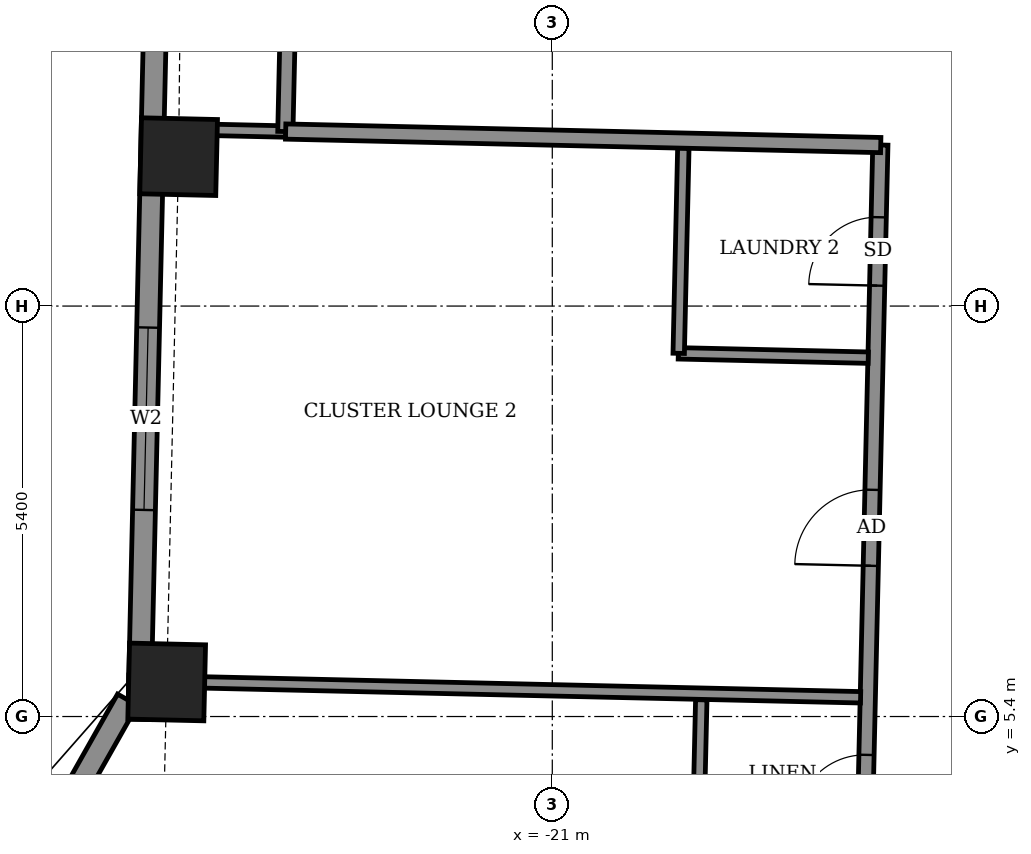
"""IFC4 building model, lengths in metres.
Left out: names, types, materials, properties, quantities, classifications, styles, units other than length and angle.
Written with IfcOpenShell. Run it as: python <this file> out.ifc"""

import sys

from ifc_helpers import new_model, si_unit, direction, frame, frame_2d, origin, origin_2d, place, context, subcontext, project, spatial, rectangle, extrude, element, fill, save


model = new_model("IFC4")
c1 = context("Model", 3, precision=1e-05, world=origin(), true_north=direction((0.0, 1.0)))
c2 = subcontext(c1, "Body", "Model", "MODEL_VIEW")
j1 = project(units=[si_unit("LENGTHUNIT", "METRE"), si_unit("PLANEANGLEUNIT", "RADIAN")], contexts=[c1])
p1 = place(None, origin())
s1 = spatial("IfcSite", under=j1, at=p1, CompositionType="ELEMENT")
p2 = place(p1, origin())
s2 = spatial("IfcBuilding", under=s1, at=p2, CompositionType="ELEMENT")
p3 = place(p2, frame((0.0, 0.0, 268.1)))
s3 = spatial("IfcBuildingStorey", under=s2, at=p3, CompositionType="ELEMENT", Elevation=268.1)
for number, where, z_axis, x_axis in (
    (1, (-25.916, 12.766, -0.55), (0.0, 0.0, 1.0), (-0.023, -1.0, 0.0)),
    (2, (-26.073, 5.855, -0.55), (0.0, 0.0, 1.0), (-0.023, -1.0, 0.0)),
):
    element("IfcColumn", number, at=place(p3, frame(where, z_axis=z_axis, x_axis=x_axis)), inside=s3, PredefinedType="COLUMN", context=c2, shape_type="SweptSolid", body=[
        extrude(rectangle(XDim=1.0, YDim=1.0, at=origin_2d()), origin(), (0.0, 0.0, 1.0), 3.6),
    ])
p4 = place(p3, frame((-26.113, 19.534, 0.0), z_axis=(0.0, 0.0, 1.0), x_axis=(-0.022649415303, -0.999743469089, 0.0)))
e3 = element("IfcWall", 3, at=p4, inside=s3, PredefinedType="SOLIDWALL", context=c2, shape_type="SweptSolid", body=[
    extrude(rectangle(XDim=14.175, YDim=0.3, at=frame_2d((7.087, 0.0))), origin(), (0.0, 0.0, 1.0), 2.55),
])
p5 = place(p4, frame((2.735, 0.0, 0.0)))
e4 = element("IfcOpeningElement", 4, at=p5, cuts=e3, PredefinedType="OPENING", context=c2, shape_type="SweptSolid", body=[
    extrude(rectangle(XDim=1.5, YDim=2.4, at=frame_2d((0.75, 1.2))), frame((0.0, 0.16, 0.0), z_axis=(0.0, -1.0, 0.0), x_axis=(1.0, 0.0, 0.0)), (0.0, 0.0, 1.0), 0.32),
])
p6 = place(p4, frame((9.019, 0.0, 0.9)))
e5 = element("IfcOpeningElement", 5, at=p6, cuts=e3, PredefinedType="OPENING", context=c2, shape_type="SweptSolid", body=[
    extrude(rectangle(XDim=2.4, YDim=1.5, at=frame_2d((1.2, 0.75))), frame((0.0, 0.16, 0.0), z_axis=(0.0, -1.0, 0.0), x_axis=(1.0, 0.0, 0.0)), (0.0, 0.0, 1.0), 0.32),
])
p7 = place(p3, frame((-26.589, 5.621, 0.0), z_axis=(0.0, 0.0, 1.0), x_axis=(-0.492495436053, -0.870315026566, 0.0)))
e6 = element("IfcWall", 6, at=p7, inside=s3, PredefinedType="SOLIDWALL", context=c2, shape_type="SweptSolid", body=[
    extrude(rectangle(XDim=5.397, YDim=0.3, at=frame_2d((2.698, 0.0))), origin(), (0.0, 0.0, 1.0), 3.05),
])
p8 = place(p7, frame((2.007, 0.0, 0.9)))
e7 = element("IfcOpeningElement", 7, at=p8, cuts=e6, PredefinedType="OPENING", context=c2, shape_type="SweptSolid", body=[
    extrude(rectangle(XDim=1.2, YDim=1.5, at=frame_2d((0.6, 0.75))), frame((0.0, 0.16, 0.0), z_axis=(0.0, -1.0, 0.0), x_axis=(1.0, 0.0, 0.0)), (0.0, 0.0, 1.0), 0.32),
])
p9 = place(p3, frame((-17.262, -12.525, 0.0), z_axis=(0.0, 0.0, 1.0), x_axis=(0.022706151961, 0.999742182097, 0.0)))
e8 = element("IfcWall", 8, at=p9, inside=s3, PredefinedType="PARTITIONING", context=c2, shape_type="SweptSolid", body=[
    extrude(rectangle(XDim=25.45, YDim=0.2, at=frame_2d((12.725, 0.0))), origin(), (0.0, 0.0, 1.0), 3.05),
])
p10 = place(p9, frame((19.913, 0.0, 0.0)))
e9 = element("IfcOpeningElement", 9, at=p10, cuts=e8, PredefinedType="OPENING", context=c2, shape_type="SweptSolid", body=[
    extrude(rectangle(XDim=1.0, YDim=2.1, at=frame_2d((0.5, 1.05))), frame((0.0, 0.11, 0.0), z_axis=(0.0, -1.0, 0.0), x_axis=(1.0, 0.0, 0.0)), (0.0, 0.0, 1.0), 0.22),
])
p11 = place(p9, frame((23.6, 0.0, 0.0)))
e10 = element("IfcOpeningElement", 10, at=p11, cuts=e8, PredefinedType="OPENING", context=c2, shape_type="SweptSolid", body=[
    extrude(rectangle(XDim=0.9, YDim=2.1, at=frame_2d((0.45, 1.05))), frame((0.0, 0.11, 0.0), z_axis=(0.0, -1.0, 0.0), x_axis=(1.0, 0.0, 0.0)), (0.0, 0.0, 1.0), 0.22),
])
p12 = place(p9, frame((14.325, 0.0, 0.0)))
e11 = element("IfcOpeningElement", 11, at=p12, cuts=e8, PredefinedType="OPENING", context=c2, shape_type="SweptSolid", body=[
    extrude(rectangle(XDim=1.0, YDim=2.1, at=frame_2d((0.5, 1.05))), frame((0.0, 0.11, 0.0), z_axis=(0.0, -1.0, 0.0), x_axis=(1.0, 0.0, 0.0)), (0.0, 0.0, 1.0), 0.22),
])
p13 = place(p9, frame((16.525, 0.0, 0.0)))
e12 = element("IfcOpeningElement", 12, at=p13, cuts=e8, PredefinedType="OPENING", context=c2, shape_type="SweptSolid", body=[
    extrude(rectangle(XDim=0.9, YDim=2.1, at=frame_2d((0.45, 1.05))), frame((0.0, 0.11, 0.0), z_axis=(0.0, -1.0, 0.0), x_axis=(1.0, 0.0, 0.0)), (0.0, 0.0, 1.0), 0.22),
])
p14 = place(p9, frame((9.85, 0.0, 0.0)))
e13 = element("IfcOpeningElement", 13, at=p14, cuts=e8, PredefinedType="OPENING", context=c2, shape_type="SweptSolid", body=[
    extrude(rectangle(XDim=1.0, YDim=2.1, at=frame_2d((0.5, 1.05))), frame((0.0, 0.11, 0.0), z_axis=(0.0, -1.0, 0.0), x_axis=(1.0, 0.0, 0.0)), (0.0, 0.0, 1.0), 0.22),
])
p15 = place(p9, frame((12.125, 0.0, 0.0)))
e14 = element("IfcOpeningElement", 14, at=p15, cuts=e8, PredefinedType="OPENING", context=c2, shape_type="SweptSolid", body=[
    extrude(rectangle(XDim=0.9, YDim=2.1, at=frame_2d((0.45, 1.05))), frame((0.0, 0.11, 0.0), z_axis=(0.0, -1.0, 0.0), x_axis=(1.0, 0.0, 0.0)), (0.0, 0.0, 1.0), 0.22),
])
p16 = place(p9, frame((7.725, 0.0, 0.0)))
e15 = element("IfcOpeningElement", 15, at=p16, cuts=e8, PredefinedType="OPENING", context=c2, shape_type="SweptSolid", body=[
    extrude(rectangle(XDim=1.0, YDim=2.1, at=frame_2d((0.5, 1.05))), frame((0.0, 0.11, 0.0), z_axis=(0.0, -1.0, 0.0), x_axis=(1.0, 0.0, 0.0)), (0.0, 0.0, 1.0), 0.22),
])
p17 = place(p9, frame((5.275, 0.0, 0.0)))
e16 = element("IfcOpeningElement", 16, at=p17, cuts=e8, PredefinedType="OPENING", context=c2, shape_type="SweptSolid", body=[
    extrude(rectangle(XDim=0.9, YDim=2.1, at=frame_2d((0.45, 1.05))), frame((0.0, 0.11, 0.0), z_axis=(0.0, -1.0, 0.0), x_axis=(1.0, 0.0, 0.0)), (0.0, 0.0, 1.0), 0.22),
])
p18 = place(p9, frame((0.512, 0.0, 0.0)))
e17 = element("IfcOpeningElement", 17, at=p18, cuts=e8, PredefinedType="OPENING", context=c2, shape_type="SweptSolid", body=[
    extrude(rectangle(XDim=1.0, YDim=2.1, at=frame_2d((0.5, 1.05))), frame((0.0, 0.11, 0.0), z_axis=(0.0, -1.0, 0.0), x_axis=(1.0, 0.0, 0.0)), (0.0, 0.0, 1.0), 0.22),
])
p19 = place(p9, frame((2.775, 0.0, 0.0)))
e18 = element("IfcOpeningElement", 18, at=p19, cuts=e8, PredefinedType="OPENING", context=c2, shape_type="SweptSolid", body=[
    extrude(rectangle(XDim=0.9, YDim=2.1, at=frame_2d((0.45, 1.05))), frame((0.0, 0.11, 0.0), z_axis=(0.0, -1.0, 0.0), x_axis=(1.0, 0.0, 0.0)), (0.0, 0.0, 1.0), 0.22),
])
p20 = place(p3, frame((-19.093, 3.296, 0.0), z_axis=(0.0, 0.0, 1.0), x_axis=(0.022788198363, 0.99974031529, 0.0)))
e19 = element("IfcWall", 19, at=p20, inside=s3, PredefinedType="PARTITIONING", context=c2, shape_type="SweptSolid", body=[
    extrude(rectangle(XDim=2.325, YDim=0.15, at=frame_2d((1.162, 0.0))), origin(), (0.0, 0.0, 1.0), 3.05),
])
p21 = place(p3, frame((-26.573, 5.871, 0.0), z_axis=(0.0, 0.0, 1.0), x_axis=(0.999743768709, -0.022636186244, 0.0)))
e20 = element("IfcWall", 20, at=p21, inside=s3, PredefinedType="PARTITIONING", context=c2, shape_type="SweptSolid", body=[
    extrude(rectangle(XDim=9.631, YDim=0.15, at=frame_2d((4.816, 0.0))), origin(), (0.0, 0.0, 1.0), 3.05),
])
p22 = place(p3, frame((-19.342, 10.178, 0.0), z_axis=(0.0, 0.0, 1.0), x_axis=(0.999741028149, -0.022756903044, 0.0)))
e21 = element("IfcWall", 21, at=p22, inside=s3, PredefinedType="PARTITIONING", context=c2, shape_type="SweptSolid", body=[
    extrude(rectangle(XDim=2.5, YDim=0.15, at=frame_2d((1.25, 0.0))), origin(), (0.0, 0.0, 1.0), 3.05),
])
p23 = place(p3, frame((-19.337, 10.178, 0.0), z_axis=(0.0, 0.0, 1.0), x_axis=(0.02260842146, 0.999744396973, 0.0)))
e22 = element("IfcWall", 22, at=p23, inside=s3, PredefinedType="PARTITIONING", context=c2, shape_type="SweptSolid", body=[
    extrude(rectangle(XDim=2.7, YDim=0.15, at=frame_2d((1.35, 0.0))), origin(), (0.0, 0.0, 1.0), 3.05),
])
p24 = place(p3, frame((-26.108, 13.132, 0.0), z_axis=(0.0, 0.0, 1.0), x_axis=(0.999746371854, -0.022520922836, 0.0)))
e23 = element("IfcWall", 23, at=p24, inside=s3, PredefinedType="PARTITIONING", context=c2, shape_type="SweptSolid", body=[
    extrude(rectangle(XDim=1.604, YDim=0.15, at=frame_2d((0.802, 0.0))), origin(), (0.0, 0.0, 1.0), 3.05),
])
p25 = place(p3, frame((-24.512, 13.096, 0.0), z_axis=(0.0, 0.0, 1.0), x_axis=(0.022617910375, 0.999744182344, 0.0)))
e24 = element("IfcWall", 24, at=p25, inside=s3, PredefinedType="PARTITIONING", context=c2, shape_type="SweptSolid", body=[
    extrude(rectangle(XDim=1.5, YDim=0.2, at=frame_2d((0.75, 0.0))), origin(), (0.0, 0.0, 1.0), 3.05),
])
p26 = place(p3, frame((-24.508, 13.096, 0.0), z_axis=(0.0, 0.0, 1.0), x_axis=(0.99974170677, -0.022727070732, 0.0)))
e25 = element("IfcWall", 25, at=p26, inside=s3, PredefinedType="PARTITIONING", context=c2, shape_type="SweptSolid", body=[
    extrude(rectangle(XDim=7.831, YDim=0.2, at=frame_2d((3.916, 0.0))), origin(), (0.0, 0.0, 1.0), 3.05),
])
p27 = place(p3, frame((-24.474, 14.596, 0.0), z_axis=(0.0, 0.0, 1.0), x_axis=(0.999742424031, -0.022695497208, 0.0)))
e26 = element("IfcWall", 26, at=p27, inside=s3, PredefinedType="PARTITIONING", context=c2, shape_type="SweptSolid", body=[
    extrude(rectangle(XDim=52.872, YDim=0.2, at=frame_2d((26.436, 0.0))), origin(), (0.0, 0.0, 1.0), 3.05),
])
p28 = place(p27, frame((51.161, 0.0, 0.0)))
e27 = element("IfcOpeningElement", 27, at=p28, cuts=e26, PredefinedType="OPENING", context=c2, shape_type="SweptSolid", body=[
    extrude(rectangle(XDim=1.0, YDim=2.1, at=frame_2d((0.5, 1.05))), frame((0.0, 0.11, 0.0), z_axis=(0.0, -1.0, 0.0), x_axis=(1.0, 0.0, 0.0)), (0.0, 0.0, 1.0), 0.22),
])
p29 = place(p27, frame((46.7, 0.0, 0.0)))
e28 = element("IfcOpeningElement", 28, at=p29, cuts=e26, PredefinedType="OPENING", context=c2, shape_type="SweptSolid", body=[
    extrude(rectangle(XDim=0.9, YDim=2.1, at=frame_2d((0.45, 1.05))), frame((0.0, 0.11, 0.0), z_axis=(0.0, -1.0, 0.0), x_axis=(1.0, 0.0, 0.0)), (0.0, 0.0, 1.0), 0.22),
])
p30 = place(p27, frame((44.3, 0.0, 0.0)))
e29 = element("IfcOpeningElement", 29, at=p30, cuts=e26, PredefinedType="OPENING", context=c2, shape_type="SweptSolid", body=[
    extrude(rectangle(XDim=0.9, YDim=2.1, at=frame_2d((0.45, 1.05))), frame((0.0, 0.11, 0.0), z_axis=(0.0, -1.0, 0.0), x_axis=(1.0, 0.0, 0.0)), (0.0, 0.0, 1.0), 0.22),
])
p31 = place(p27, frame((37.575, 0.0, 0.0)))
e30 = element("IfcOpeningElement", 30, at=p31, cuts=e26, PredefinedType="OPENING", context=c2, shape_type="SweptSolid", body=[
    extrude(rectangle(XDim=0.9, YDim=2.1, at=frame_2d((0.45, 1.05))), frame((0.0, 0.11, 0.0), z_axis=(0.0, -1.0, 0.0), x_axis=(1.0, 0.0, 0.0)), (0.0, 0.0, 1.0), 0.22),
])
p32 = place(p27, frame((35.675, 0.0, 0.0)))
e31 = element("IfcOpeningElement", 31, at=p32, cuts=e26, PredefinedType="OPENING", context=c2, shape_type="SweptSolid", body=[
    extrude(rectangle(XDim=0.9, YDim=2.1, at=frame_2d((0.45, 1.05))), frame((0.0, 0.11, 0.0), z_axis=(0.0, -1.0, 0.0), x_axis=(1.0, 0.0, 0.0)), (0.0, 0.0, 1.0), 0.22),
])
p33 = place(p27, frame((28.95, 0.0, 0.0)))
e32 = element("IfcOpeningElement", 32, at=p33, cuts=e26, PredefinedType="OPENING", context=c2, shape_type="SweptSolid", body=[
    extrude(rectangle(XDim=0.9, YDim=2.1, at=frame_2d((0.45, 1.05))), frame((0.0, 0.11, 0.0), z_axis=(0.0, -1.0, 0.0), x_axis=(1.0, 0.0, 0.0)), (0.0, 0.0, 1.0), 0.22),
])
p34 = place(p27, frame((27.0, 0.0, 0.0)))
e33 = element("IfcOpeningElement", 33, at=p34, cuts=e26, PredefinedType="OPENING", context=c2, shape_type="SweptSolid", body=[
    extrude(rectangle(XDim=0.9, YDim=2.1, at=frame_2d((0.45, 1.05))), frame((0.0, 0.11, 0.0), z_axis=(0.0, -1.0, 0.0), x_axis=(1.0, 0.0, 0.0)), (0.0, 0.0, 1.0), 0.22),
])
p35 = place(p27, frame((20.2, 0.0, 0.0)))
e34 = element("IfcOpeningElement", 34, at=p35, cuts=e26, PredefinedType="OPENING", context=c2, shape_type="SweptSolid", body=[
    extrude(rectangle(XDim=0.9, YDim=2.1, at=frame_2d((0.45, 1.05))), frame((0.0, 0.11, 0.0), z_axis=(0.0, -1.0, 0.0), x_axis=(1.0, 0.0, 0.0)), (0.0, 0.0, 1.0), 0.22),
])
p36 = place(p27, frame((18.25, 0.0, 0.0)))
e35 = element("IfcOpeningElement", 35, at=p36, cuts=e26, PredefinedType="OPENING", context=c2, shape_type="SweptSolid", body=[
    extrude(rectangle(XDim=0.9, YDim=2.1, at=frame_2d((0.45, 1.05))), frame((0.0, 0.11, 0.0), z_axis=(0.0, -1.0, 0.0), x_axis=(1.0, 0.0, 0.0)), (0.0, 0.0, 1.0), 0.22),
])
p37 = place(p27, frame((11.5, 0.0, 0.0)))
e36 = element("IfcOpeningElement", 36, at=p37, cuts=e26, PredefinedType="OPENING", context=c2, shape_type="SweptSolid", body=[
    extrude(rectangle(XDim=0.9, YDim=2.1, at=frame_2d((0.45, 1.05))), frame((0.0, 0.11, 0.0), z_axis=(0.0, -1.0, 0.0), x_axis=(1.0, 0.0, 0.0)), (0.0, 0.0, 1.0), 0.22),
])
p38 = place(p27, frame((9.475, 0.0, 0.0)))
e37 = element("IfcOpeningElement", 37, at=p38, cuts=e26, PredefinedType="OPENING", context=c2, shape_type="SweptSolid", body=[
    extrude(rectangle(XDim=0.9, YDim=2.1, at=frame_2d((0.45, 1.05))), frame((0.0, 0.11, 0.0), z_axis=(0.0, -1.0, 0.0), x_axis=(1.0, 0.0, 0.0)), (0.0, 0.0, 1.0), 0.22),
])
p39 = place(p27, frame((2.293, 0.0, 0.0)))
e38 = element("IfcOpeningElement", 38, at=p39, cuts=e26, PredefinedType="OPENING", context=c2, shape_type="SweptSolid", body=[
    extrude(rectangle(XDim=1.0, YDim=2.1, at=frame_2d((0.5, 1.05))), frame((0.0, 0.11, 0.0), z_axis=(0.0, -1.0, 0.0), x_axis=(1.0, 0.0, 0.0)), (0.0, 0.0, 1.0), 0.22),
])
p40 = place(p6, origin())
e39 = element("IfcWindow", 39, at=p40, inside=s3, PartitioningType="DOUBLE_PANEL_VERTICAL", PredefinedType="WINDOW", context=c2, shape_type="SweptSolid", body=[
    extrude(rectangle(XDim=2.4, YDim=1.5, at=frame_2d((1.2, 0.75))), frame((0.0, 0.03, 0.0), z_axis=(0.0, -1.0, 0.0), x_axis=(1.0, 0.0, 0.0)), (0.0, 0.0, 1.0), 0.06),
])
fill(e5, e39)
p41 = place(p10, origin())
e40 = element("IfcDoor", 40, at=p41, inside=s3, OperationType="SINGLE_SWING_LEFT", PredefinedType="DOOR", context=c2, shape_type="SweptSolid", body=[
    extrude(rectangle(XDim=1.0, YDim=2.1, at=frame_2d((0.5, 1.05))), frame((0.0, 0.025, 0.0), z_axis=(0.0, -1.0, 0.0), x_axis=(1.0, 0.0, 0.0)), (0.0, 0.0, 1.0), 0.05),
])
fill(e9, e40)
p42 = place(p11, origin())
e41 = element("IfcDoor", 41, at=p42, inside=s3, OperationType="SINGLE_SWING_LEFT", PredefinedType="DOOR", context=c2, shape_type="SweptSolid", body=[
    extrude(rectangle(XDim=0.9, YDim=2.1, at=frame_2d((0.45, 1.05))), frame((0.0, 0.025, 0.0), z_axis=(0.0, -1.0, 0.0), x_axis=(1.0, 0.0, 0.0)), (0.0, 0.0, 1.0), 0.05),
])
fill(e10, e41)
p43 = place(p13, origin())
e42 = element("IfcDoor", 42, at=p43, inside=s3, OperationType="SINGLE_SWING_RIGHT", PredefinedType="DOOR", context=c2, shape_type="SweptSolid", body=[
    extrude(rectangle(XDim=0.9, YDim=2.1, at=frame_2d((0.45, 1.05))), frame((0.0, 0.025, 0.0), z_axis=(0.0, -1.0, 0.0), x_axis=(1.0, 0.0, 0.0)), (0.0, 0.0, 1.0), 0.05),
])
fill(e12, e42)
save(model, sys.argv[1])
